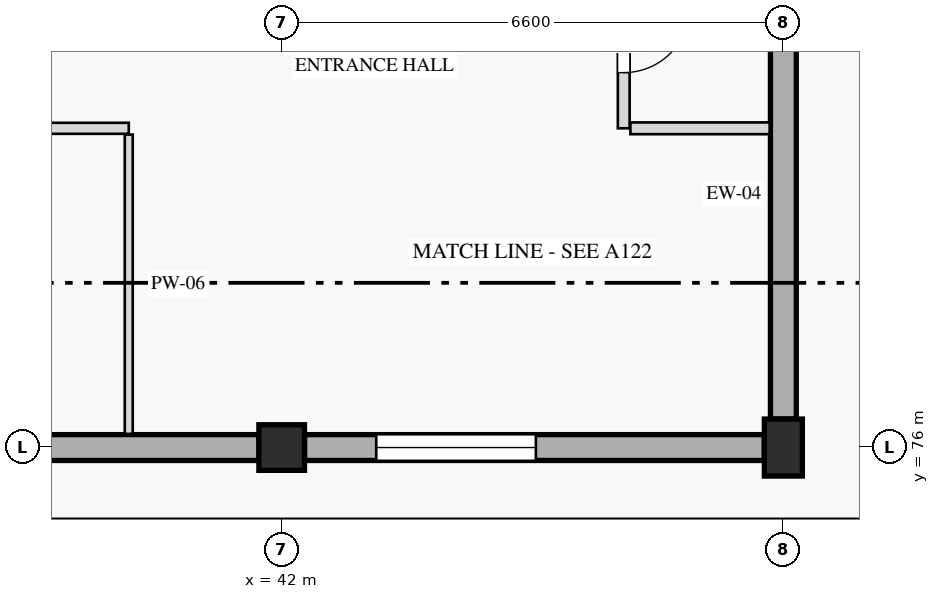
"""IFC4 building model, lengths in metres.
Left out: names, types, materials, properties, quantities, classifications, styles, units other than length and angle.
Written with IfcOpenShell. Run it as: python <this file> out.ifc"""

import sys

from ifc_helpers import new_model, si_unit, direction, frame, frame_2d, origin, origin_2d, place, context, subcontext, project, spatial, rectangle, extrude, element, fill, save


model = new_model("IFC4")
c1 = context("Model", 3, precision=1e-05, world=origin(), true_north=direction((0.0, 1.0)))
c2 = subcontext(c1, "Body", "Model", "MODEL_VIEW")
j1 = project(units=[si_unit("LENGTHUNIT", "METRE"), si_unit("PLANEANGLEUNIT", "RADIAN")], contexts=[c1])
p1 = place(None, origin())
s1 = spatial("IfcSite", under=j1, at=p1, CompositionType="ELEMENT")
p2 = place(p1, origin())
s2 = spatial("IfcBuilding", under=s1, at=p2, CompositionType="ELEMENT")
p3 = place(p2, frame((0.0, 0.0, 4.2)))
s3 = spatial("IfcBuildingStorey", under=s2, at=p3, CompositionType="ELEMENT", Elevation=4.2)
p4 = place(p3, frame((42.0, 76.0, 0.0), z_axis=(0.0, 0.0, 1.0), x_axis=(1.0, 0.0, 0.0)))
e1 = element("IfcColumn", 1, at=p4, inside=s3, PredefinedType="COLUMN", context=c2, shape_type="SweptSolid", body=[
    extrude(rectangle(XDim=0.6, YDim=0.6, at=origin_2d()), origin(), (0.0, 0.0, 1.0), 4.2),
])
p5 = place(p3, frame((48.6, 76.0, 0.0), z_axis=(0.0, 0.0, 1.0), x_axis=(1.0, 0.0, 0.0)))
e2 = element("IfcColumn", 2, at=p5, inside=s3, PredefinedType="COLUMN", context=c2, shape_type="SweptSolid", body=[
    extrude(rectangle(XDim=0.5, YDim=0.75, at=origin_2d()), origin(), (0.0, 0.0, 1.0), 4.2),
])
p6 = place(p3, frame((35.7, 76.0, 0.0), z_axis=(0.0, 0.0, 1.0), x_axis=(1.0, 0.0, 0.0)))
e3 = element("IfcWall", 3, at=p6, inside=s3, PredefinedType="STANDARD", context=c2, shape_type="SweptSolid", body=[
    extrude(rectangle(XDim=6.0, YDim=0.34, at=frame_2d((3.0, 0.0))), origin(), (0.0, 0.0, 1.0), 3.6),
])
p7 = place(p6, frame((0.35, 0.0, 0.85)))
e4 = element("IfcOpeningElement", 4, at=p7, cuts=e3, PredefinedType="OPENING", context=c2, shape_type="SweptSolid", body=[
    extrude(rectangle(XDim=1.8, YDim=1.35, at=frame_2d((0.9, 0.675))), frame((0.0, 0.18, 0.0), z_axis=(0.0, -1.0, 0.0), x_axis=(1.0, 0.0, 0.0)), (0.0, 0.0, 1.0), 0.36),
])
p8 = place(p3, frame((42.3, 76.0, 0.0), z_axis=(0.0, 0.0, 1.0), x_axis=(1.0, 0.0, 0.0)))
e5 = element("IfcWall", 5, at=p8, inside=s3, PredefinedType="STANDARD", context=c2, shape_type="SweptSolid", body=[
    extrude(rectangle(XDim=6.05, YDim=0.34, at=frame_2d((3.025, 0.0))), origin(), (0.0, 0.0, 1.0), 3.6),
])
p9 = place(p8, frame((0.944, 0.0, 0.85)))
e6 = element("IfcOpeningElement", 6, at=p9, cuts=e5, PredefinedType="OPENING", context=c2, shape_type="SweptSolid", body=[
    extrude(rectangle(XDim=2.1, YDim=1.55, at=frame_2d((1.05, 0.775))), frame((0.0, 0.18, 0.0), z_axis=(0.0, -1.0, 0.0), x_axis=(1.0, 0.0, 0.0)), (0.0, 0.0, 1.0), 0.36),
])
p10 = place(p3, frame((48.6, 76.375, 0.0), z_axis=(0.0, 0.0, 1.0), x_axis=(0.0, 1.0, 0.0)))
e7 = element("IfcWall", 7, at=p10, inside=s3, PredefinedType="STANDARD", context=c2, shape_type="SweptSolid", body=[
    extrude(rectangle(XDim=5.925, YDim=0.34, at=frame_2d((2.962, 0.0))), origin(), (0.0, 0.0, 1.0), 3.65),
])
p11 = place(p3, frame((46.5, 82.502, 0.0), z_axis=(0.0, 0.0, 1.0), x_axis=(0.0, -1.0, 0.0)))
e8 = element("IfcWall", 8, at=p11, inside=s3, PredefinedType="PARTITIONING", context=c2, shape_type="SweptSolid", body=[
    extrude(rectangle(XDim=2.302, YDim=0.155, at=frame_2d((1.151, 0.0))), origin(), (0.0, 0.0, 1.0), 3.96),
])
p12 = place(p11, frame((0.7, 0.0, 0.0)))
e9 = element("IfcOpeningElement", 9, at=p12, cuts=e8, PredefinedType="OPENING", context=c2, shape_type="SweptSolid", body=[
    extrude(rectangle(XDim=0.87, YDim=2.08, at=frame_2d((0.435, 1.04))), frame((0.0, 0.087, 0.0), z_axis=(0.0, -1.0, 0.0), x_axis=(1.0, 0.0, 0.0)), (0.0, 0.0, 1.0), 0.175),
])
p13 = place(p3, frame((46.587, 80.2, 0.0), z_axis=(0.0, 0.0, 1.0), x_axis=(1.0, 0.0, 0.0)))
e10 = element("IfcWall", 10, at=p13, inside=s3, PredefinedType="PARTITIONING", context=c2, shape_type="SweptSolid", body=[
    extrude(rectangle(XDim=1.833, YDim=0.155, at=frame_2d((0.916, 0.0))), origin(), (0.0, 0.0, 1.0), 3.96),
])
p14 = place(p3, frame((32.433, 80.2, 0.0), z_axis=(0.0, 0.0, 1.0), x_axis=(1.0, 0.0, 0.0)))
e11 = element("IfcWall", 11, at=p14, inside=s3, PredefinedType="PARTITIONING", context=c2, shape_type="SweptSolid", body=[
    extrude(rectangle(XDim=7.555, YDim=0.145, at=frame_2d((3.778, 0.0))), origin(), (0.0, 0.0, 1.0), 3.96),
])
p15 = place(p14, frame((3.394, 0.0, 0.0)))
e12 = element("IfcOpeningElement", 12, at=p15, cuts=e11, PredefinedType="OPENING", context=c2, shape_type="SweptSolid", body=[
    extrude(rectangle(XDim=0.9, YDim=2.1, at=frame_2d((0.45, 1.05))), frame((0.0, 0.083, 0.0), z_axis=(0.0, -1.0, 0.0), x_axis=(1.0, 0.0, 0.0)), (0.0, 0.0, 1.0), 0.165),
])
p16 = place(p3, frame((39.988, 80.117, 0.0), z_axis=(0.0, 0.0, 1.0), x_axis=(0.0, -1.0, 0.0)))
e13 = element("IfcWall", 13, at=p16, inside=s3, PredefinedType="PARTITIONING", context=c2, shape_type="SweptSolid", body=[
    extrude(rectangle(XDim=3.938, YDim=0.105, at=frame_2d((1.969, 0.0))), origin(), (0.0, 0.0, 1.0), 3.96),
])
p17 = place(p9, origin())
e14 = element("IfcWindow", 14, at=p17, inside=s3, PartitioningType="SINGLE_PANEL", PredefinedType="WINDOW", context=c2, shape_type="SweptSolid", body=[
    extrude(rectangle(XDim=2.1, YDim=1.55, at=frame_2d((1.05, 0.775))), frame((0.0, 0.03, 0.0), z_axis=(0.0, -1.0, 0.0), x_axis=(1.0, 0.0, 0.0)), (0.0, 0.0, 1.0), 0.06),
])
fill(e6, e14)
p18 = place(p12, origin())
e15 = element("IfcDoor", 15, at=p18, inside=s3, OperationType="SINGLE_SWING_LEFT", PredefinedType="DOOR", context=c2, shape_type="SweptSolid", body=[
    extrude(rectangle(XDim=0.87, YDim=2.08, at=frame_2d((0.435, 1.04))), frame((0.0, 0.025, 0.0), z_axis=(0.0, -1.0, 0.0), x_axis=(1.0, 0.0, 0.0)), (0.0, 0.0, 1.0), 0.05),
])
fill(e9, e15)
save(model, sys.argv[1])
